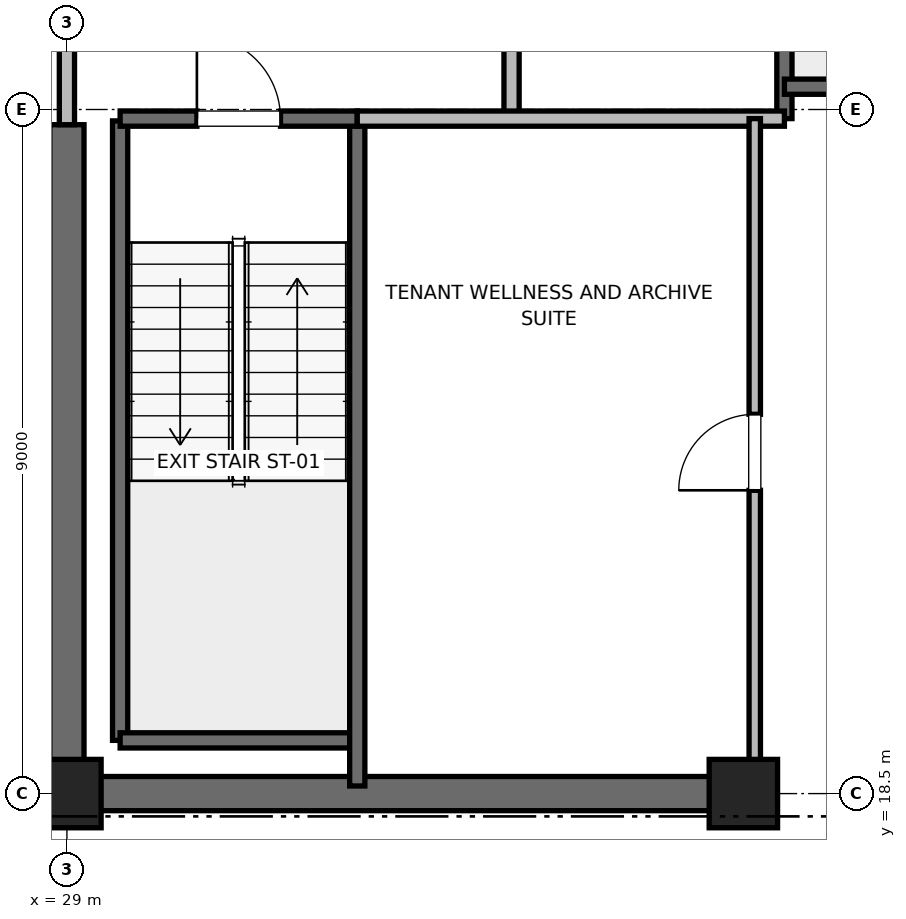
"""IFC4 building model, lengths in metres.
Left out: names, types, materials, properties, quantities, classifications, styles, units other than length and angle.
Written with IfcOpenShell. Run it as: python <this file> out.ifc"""

import sys

from ifc_helpers import new_model, si_unit, direction, frame, frame_2d, origin, origin_2d, place, context, subcontext, project, spatial, rectangle, extrude, element, fill, save


model = new_model("IFC4")
c1 = context("Model", 3, precision=1e-05, world=origin(), true_north=direction((0.0, 1.0)))
c2 = subcontext(c1, "Body", "Model", "MODEL_VIEW")
j1 = project(units=[si_unit("LENGTHUNIT", "METRE"), si_unit("PLANEANGLEUNIT", "RADIAN")], contexts=[c1])
p1 = place(None, origin())
s1 = spatial("IfcSite", under=j1, at=p1, CompositionType="ELEMENT")
p2 = place(p1, origin())
s2 = spatial("IfcBuilding", under=s1, at=p2, CompositionType="ELEMENT")
p3 = place(p2, frame((0.0, 0.0, 275.2)))
s3 = spatial("IfcBuildingStorey", under=s2, at=p3, CompositionType="ELEMENT", Elevation=275.2)
for number, where, z_axis, x_axis in (
    (1, (29.0, 18.5, 0.0), (0.0, 0.0, 1.0), (1.0, 0.0, 0.0)),
    (2, (37.9, 18.5, 0.0), (0.0, 0.0, 1.0), (1.0, 0.0, 0.0)),
):
    element("IfcColumn", number, at=place(p3, frame(where, z_axis=z_axis, x_axis=x_axis)), inside=s3, PredefinedType="PILASTER", context=c2, shape_type="SweptSolid", body=[
        extrude(rectangle(XDim=0.9, YDim=0.9, at=origin_2d()), origin(), (0.0, 0.0, 1.0), 4.0),
    ])
p4 = place(p3, frame((29.0, 18.5, 0.0), z_axis=(0.0, 0.0, 1.0), x_axis=(1.0, 0.0, 0.0)))
e3 = element("IfcWall", 3, at=p4, inside=s3, PredefinedType="SHEAR", context=c2, shape_type="SweptSolid", body=[
    extrude(rectangle(XDim=9.2, YDim=0.45, at=frame_2d((4.6, 0.0))), origin(), (0.0, 0.0, 1.0), 3.785),
])
p5 = place(p3, frame((29.0, 18.5, 0.0), z_axis=(0.0, 0.0, 1.0), x_axis=(0.0, 1.0, 0.0)))
e4 = element("IfcWall", 4, at=p5, inside=s3, PredefinedType="SHEAR", context=c2, shape_type="SweptSolid", body=[
    extrude(rectangle(XDim=8.8, YDim=0.45, at=frame_2d((4.4, 0.0))), origin(), (0.0, 0.0, 1.0), 3.785),
])
p6 = place(p3, frame((29.7, 19.2, 0.0), z_axis=(0.0, 0.0, 1.0), x_axis=(0.0, 1.0, 0.0)))
e5 = element("IfcWall", 5, at=p6, inside=s3, PredefinedType="SOLIDWALL", context=c2, shape_type="SweptSolid", body=[
    extrude(rectangle(XDim=8.15, YDim=0.2, at=frame_2d((4.075, 0.0))), origin(), (0.0, 0.0, 1.0), 3.785),
])
p7 = place(p3, frame((29.7, 19.2, 0.0), z_axis=(0.0, 0.0, 1.0), x_axis=(1.0, 0.0, 0.0)))
e6 = element("IfcWall", 6, at=p7, inside=s3, PredefinedType="SOLIDWALL", context=c2, shape_type="SweptSolid", body=[
    extrude(rectangle(XDim=3.12, YDim=0.2, at=frame_2d((1.56, 0.0))), origin(), (0.0, 0.0, 1.0), 3.785),
])
p8 = place(p3, frame((32.82, 18.6, 0.0), z_axis=(0.0, 0.0, 1.0), x_axis=(0.0, 1.0, 0.0)))
e7 = element("IfcWall", 7, at=p8, inside=s3, PredefinedType="SOLIDWALL", context=c2, shape_type="SweptSolid", body=[
    extrude(rectangle(XDim=8.78, YDim=0.2, at=frame_2d((4.39, 0.0))), origin(), (0.0, 0.0, 1.0), 3.785),
])
p9 = place(p3, frame((29.7, 27.38, 0.0), z_axis=(0.0, 0.0, 1.0), x_axis=(1.0, 0.0, 0.0)))
e8 = element("IfcWall", 8, at=p9, inside=s3, PredefinedType="SOLIDWALL", context=c2, shape_type="SweptSolid", body=[
    extrude(rectangle(XDim=3.12, YDim=0.2, at=frame_2d((1.56, 0.0))), origin(), (0.0, 0.0, 1.0), 3.785),
])
p10 = place(p9, frame((1.01, 0.0, 0.0)))
e9 = element("IfcOpeningElement", 9, at=p10, cuts=e8, PredefinedType="OPENING", context=c2, shape_type="SweptSolid", body=[
    extrude(rectangle(XDim=1.1, YDim=2.15, at=frame_2d((0.55, 1.075))), frame((0.0, 0.1, 0.0), z_axis=(0.0, -1.0, 0.0), x_axis=(1.0, 0.0, 0.0)), (0.0, 0.0, 1.0), 0.2),
])
p11 = place(p3, frame((38.44, 27.38, 0.0), z_axis=(0.0, 0.0, 1.0), x_axis=(0.0, 1.0, 0.0)))
e10 = element("IfcWall", 10, at=p11, inside=s3, PredefinedType="SOLIDWALL", context=c2, shape_type="SweptSolid", body=[
    extrude(rectangle(XDim=8.87, YDim=0.2, at=frame_2d((4.435, 0.0))), origin(), (0.0, 0.0, 1.0), 3.785),
])
p12 = place(p3, frame((38.44, 27.8, 0.0), z_axis=(0.0, 0.0, 1.0), x_axis=(1.0, 0.0, 0.0)))
e11 = element("IfcWall", 11, at=p12, inside=s3, PredefinedType="SOLIDWALL", context=c2, shape_type="SweptSolid", body=[
    extrude(rectangle(XDim=3.32, YDim=0.2, at=frame_2d((1.66, 0.0))), origin(), (0.0, 0.0, 1.0), 3.785),
])
p13 = place(p3, frame((34.85, 27.38, 0.0), z_axis=(0.0, 0.0, 1.0), x_axis=(0.0, 1.0, 0.0)))
e12 = element("IfcWall", 12, at=p13, inside=s3, PredefinedType="PARTITIONING", context=c2, shape_type="SweptSolid", body=[
    extrude(rectangle(XDim=3.37, YDim=0.2, at=frame_2d((1.685, 0.0))), origin(), (0.0, 0.0, 1.0), 3.785),
])
p14 = place(p13, frame((1.11, 0.0, 0.0)))
e13 = element("IfcOpeningElement", 13, at=p14, cuts=e12, PredefinedType="OPENING", context=c2, shape_type="SweptSolid", body=[
    extrude(rectangle(XDim=1.15, YDim=2.2, at=frame_2d((0.575, 1.1))), frame((0.0, 0.1, 0.0), z_axis=(0.0, -1.0, 0.0), x_axis=(1.0, 0.0, 0.0)), (0.0, 0.0, 1.0), 0.2),
])
p15 = place(p3, frame((29.0, 27.3, 0.0), z_axis=(0.0, 0.0, 1.0), x_axis=(0.0, 1.0, 0.0)))
e14 = element("IfcWall", 14, at=p15, inside=s3, PredefinedType="PARTITIONING", context=c2, shape_type="SweptSolid", body=[
    extrude(rectangle(XDim=3.4, YDim=0.2, at=frame_2d((1.7, 0.0))), origin(), (0.0, 0.0, 1.0), 2.865),
])
p16 = place(p15, frame((1.125, 0.0, 0.0)))
e15 = element("IfcOpeningElement", 15, at=p16, cuts=e14, PredefinedType="OPENING", context=c2, shape_type="SweptSolid", body=[
    extrude(rectangle(XDim=1.15, YDim=2.2, at=frame_2d((0.575, 1.1))), frame((0.0, 0.1, 0.0), z_axis=(0.0, -1.0, 0.0), x_axis=(1.0, 0.0, 0.0)), (0.0, 0.0, 1.0), 0.2),
])
p17 = place(p3, frame((32.82, 27.38, 0.0), z_axis=(0.0, 0.0, 1.0), x_axis=(1.0, 0.0, 0.0)))
e16 = element("IfcWall", 16, at=p17, inside=s3, PredefinedType="PARTITIONING", context=c2, shape_type="SweptSolid", body=[
    extrude(rectangle(XDim=5.62, YDim=0.2, at=frame_2d((2.81, 0.0))), origin(), (0.0, 0.0, 1.0), 3.785),
])
p18 = place(p3, frame((38.05, 18.6, 0.0), z_axis=(0.0, 0.0, 1.0), x_axis=(0.0, 1.0, 0.0)))
e17 = element("IfcWall", 17, at=p18, inside=s3, PredefinedType="PARTITIONING", context=c2, shape_type="SweptSolid", body=[
    extrude(rectangle(XDim=8.78, YDim=0.15, at=frame_2d((4.39, 0.0))), origin(), (0.0, 0.0, 1.0), 2.85),
])
p19 = place(p18, frame((3.89, 0.0, 0.0)))
e18 = element("IfcOpeningElement", 18, at=p19, cuts=e17, PredefinedType="OPENING", context=c2, shape_type="SweptSolid", body=[
    extrude(rectangle(XDim=1.0, YDim=2.15, at=frame_2d((0.5, 1.075))), frame((0.0, 0.075, 0.0), z_axis=(0.0, -1.0, 0.0), x_axis=(1.0, 0.0, 0.0)), (0.0, 0.0, 1.0), 0.15),
])
p20 = place(p10, origin())
e19 = element("IfcDoor", 19, at=p20, inside=s3, OperationType="SINGLE_SWING_LEFT", PredefinedType="DOOR", context=c2, shape_type="SweptSolid", body=[
    extrude(rectangle(XDim=1.1, YDim=2.15, at=frame_2d((0.55, 1.075))), frame((0.0, 0.025, 0.0), z_axis=(0.0, -1.0, 0.0), x_axis=(1.0, 0.0, 0.0)), (0.0, 0.0, 1.0), 0.05),
])
fill(e9, e19)
p21 = place(p19, origin())
e20 = element("IfcDoor", 20, at=p21, inside=s3, OperationType="SINGLE_SWING_LEFT", PredefinedType="DOOR", context=c2, shape_type="SweptSolid", body=[
    extrude(rectangle(XDim=1.0, YDim=2.15, at=frame_2d((0.5, 1.075))), frame((0.0, 0.025, 0.0), z_axis=(0.0, -1.0, 0.0), x_axis=(1.0, 0.0, 0.0)), (0.0, 0.0, 1.0), 0.05),
])
fill(e18, e20)
save(model, sys.argv[1])
